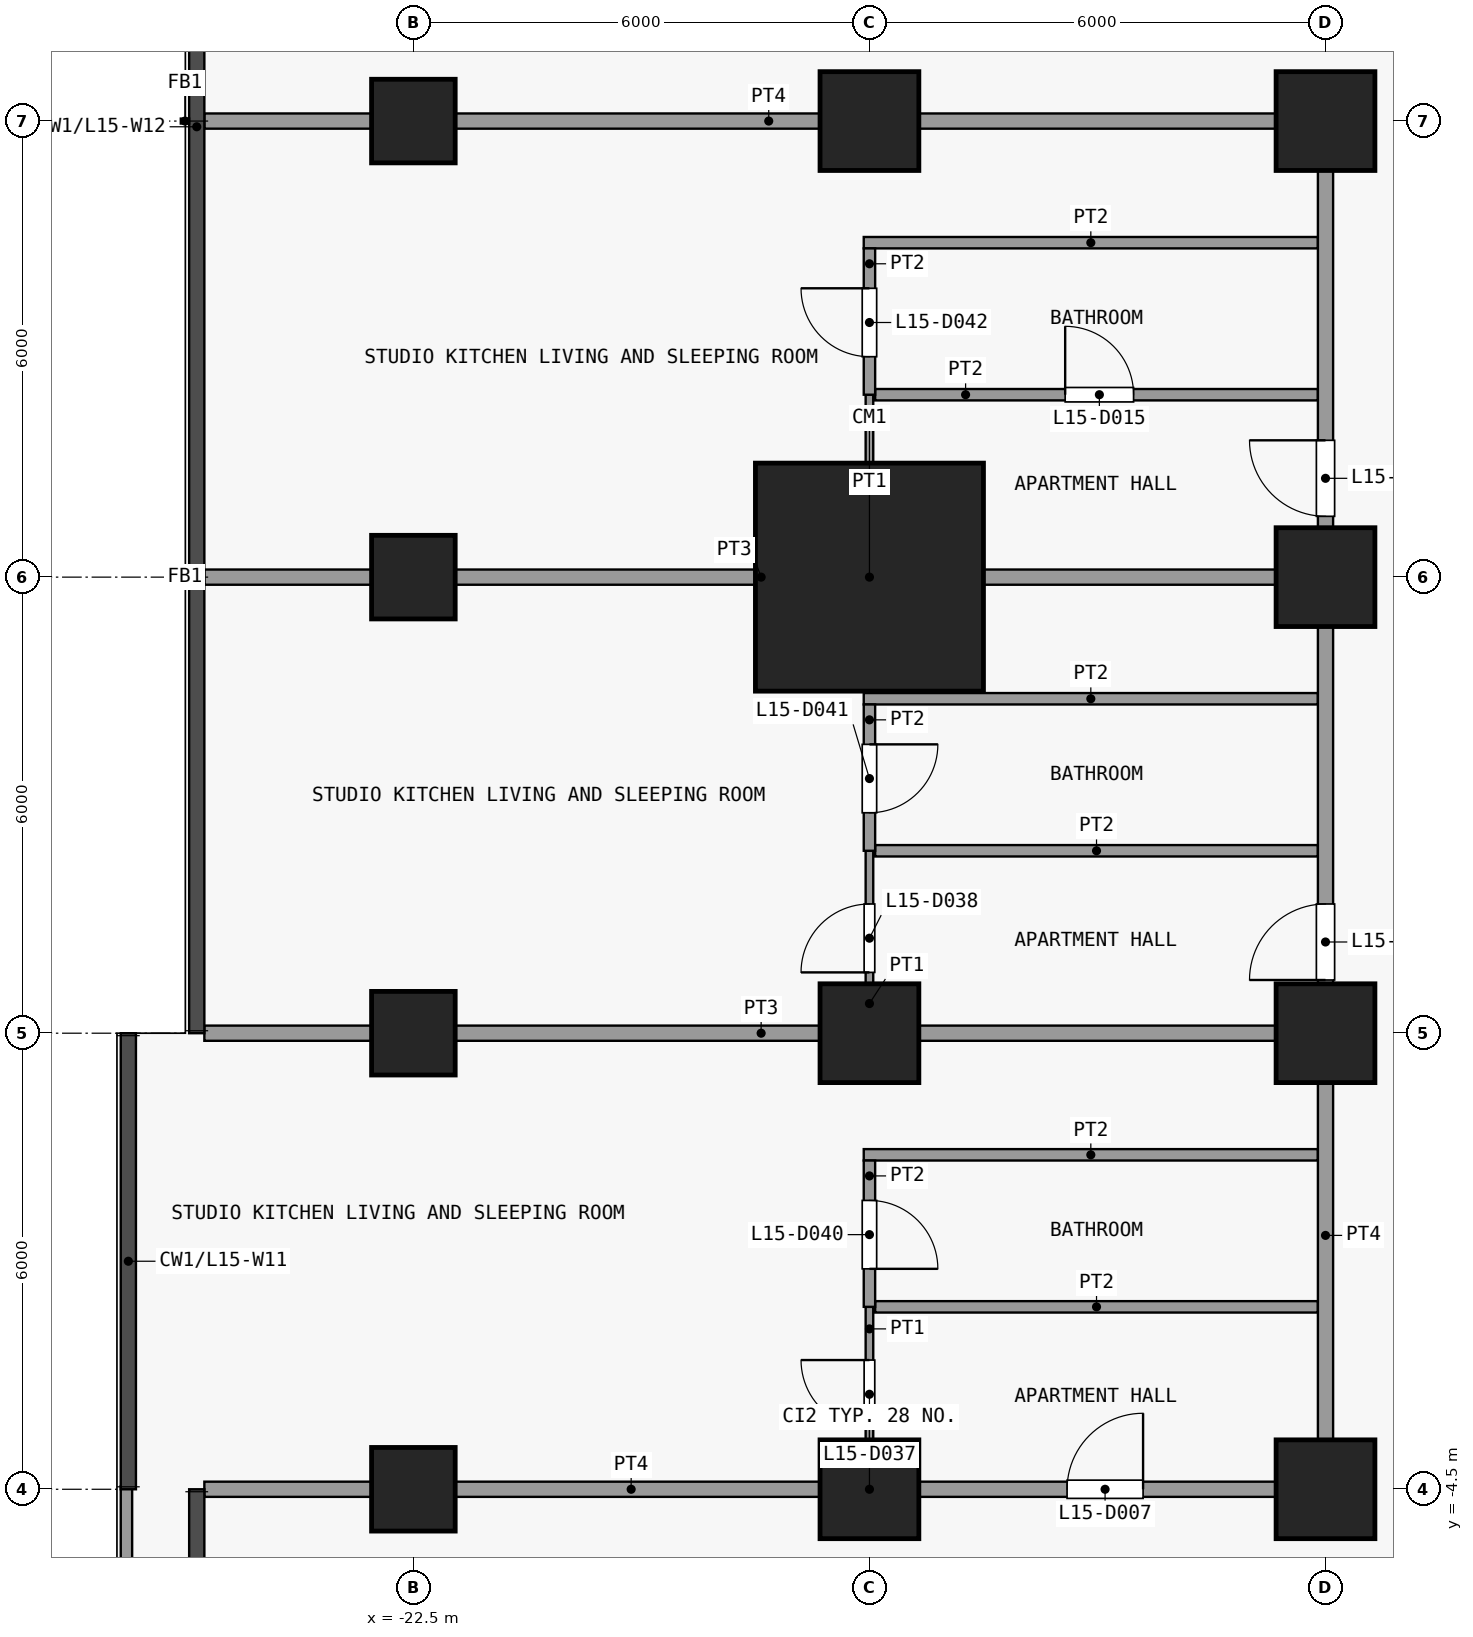
"""IFC4 building model, lengths in metres.
Left out: names, types, materials, properties, quantities, classifications, styles, units other than length and angle.
Written with IfcOpenShell. Run it as: python <this file> out.ifc"""

import sys

from ifc_helpers import new_model, si_unit, direction, frame, frame_2d, origin, origin_2d, place, context, subcontext, project, spatial, rectangle, extrude, element, fill, save


model = new_model("IFC4")
c1 = context("Model", 3, precision=1e-05, world=origin(), true_north=direction((0.0, 1.0)))
c2 = subcontext(c1, "Body", "Model", "MODEL_VIEW")
j1 = project(units=[si_unit("LENGTHUNIT", "METRE"), si_unit("PLANEANGLEUNIT", "RADIAN")], contexts=[c1])
p1 = place(None, origin())
s1 = spatial("IfcSite", under=j1, at=p1, CompositionType="ELEMENT")
p2 = place(p1, origin())
s2 = spatial("IfcBuilding", under=s1, at=p2, CompositionType="ELEMENT")
p3 = place(p2, frame((0.0, 0.0, 64.9)))
s3 = spatial("IfcBuildingStorey", under=s2, at=p3, CompositionType="ELEMENT", Elevation=64.9)
for number, where, z_axis, x_axis in (
    (1, (-22.5, -4.5, 0.0), (0.0, 0.0, 1.0), (1.0, 0.0, 0.0)),
    (2, (-22.5, 1.5, 0.0), (0.0, 0.0, 1.0), (1.0, 0.0, 0.0)),
    (3, (-22.5, 7.5, 0.0), (0.0, 0.0, 1.0), (1.0, 0.0, 0.0)),
    (4, (-22.5, 13.5, 0.0), (0.0, 0.0, 1.0), (1.0, 0.0, 0.0)),
):
    element("IfcColumn", number, at=place(p3, frame(where, z_axis=z_axis, x_axis=x_axis)), inside=s3, PredefinedType="COLUMN", context=c2, shape_type="SweptSolid", body=[
        extrude(rectangle(XDim=1.1, YDim=1.1, at=origin_2d()), origin(), (0.0, 0.0, 1.0), 3.6),
    ])
for number, where, z_axis, x_axis in (
    (5, (-16.5, -4.5, 0.0), (0.0, 0.0, 1.0), (1.0, 0.0, 0.0)),
    (6, (-16.5, 1.5, 0.0), (0.0, 0.0, 1.0), (1.0, 0.0, 0.0)),
):
    element("IfcColumn", number, at=place(p3, frame(where, z_axis=z_axis, x_axis=x_axis)), inside=s3, PredefinedType="COLUMN", context=c2, shape_type="SweptSolid", body=[
        extrude(rectangle(XDim=1.3, YDim=1.3, at=origin_2d()), origin(), (0.0, 0.0, 1.0), 3.6),
    ])
p4 = place(p3, frame((-16.5, 7.5, 0.0), z_axis=(0.0, 0.0, 1.0), x_axis=(1.0, 0.0, 0.0)))
e7 = element("IfcColumn", 7, at=p4, inside=s3, PredefinedType="COLUMN", context=c2, shape_type="SweptSolid", body=[
    extrude(rectangle(XDim=3.0, YDim=3.0, at=origin_2d()), origin(), (0.0, 0.0, 1.0), 3.6),
])
for number, where, z_axis, x_axis in (
    (8, (-16.5, 13.5, 0.0), (0.0, 0.0, 1.0), (1.0, 0.0, 0.0)),
    (9, (-10.5, -4.5, 0.0), (0.0, 0.0, 1.0), (1.0, 0.0, 0.0)),
    (10, (-10.5, 1.5, 0.0), (0.0, 0.0, 1.0), (1.0, 0.0, 0.0)),
    (11, (-10.5, 7.5, 0.0), (0.0, 0.0, 1.0), (1.0, 0.0, 0.0)),
    (12, (-10.5, 13.5, 0.0), (0.0, 0.0, 1.0), (1.0, 0.0, 0.0)),
):
    element("IfcColumn", number, at=place(p3, frame(where, z_axis=z_axis, x_axis=x_axis)), inside=s3, PredefinedType="COLUMN", context=c2, shape_type="SweptSolid", body=[
        extrude(rectangle(XDim=1.3, YDim=1.3, at=origin_2d()), origin(), (0.0, 0.0, 1.0), 3.6),
    ])
p5 = place(p3, frame((-26.275, -13.3, 0.0), z_axis=(0.0, 0.0, 1.0), x_axis=(0.0, 1.0, 0.0)))
e13 = element("IfcWall", 13, at=p5, inside=s3, PredefinedType="PARAPET", context=c2, shape_type="SweptSolid", body=[
    extrude(rectangle(XDim=8.84, YDim=0.15, at=frame_2d((4.42, 0.0))), origin(), (0.0, 0.0, 1.0), 1.15),
])
p6 = place(p3, frame((-25.25, -4.5, 0.0), z_axis=(0.0, 0.0, 1.0), x_axis=(1.0, 0.0, 0.0)))
e14 = element("IfcWall", 14, at=p6, inside=s3, PredefinedType="PARTITIONING", context=c2, shape_type="SweptSolid", body=[
    extrude(rectangle(XDim=14.85, YDim=0.2, at=frame_2d((7.425, 0.0))), origin(), (0.0, 0.0, 1.0), 3.3),
])
p7 = place(p6, frame((11.35, 0.0, 0.0)))
e15 = element("IfcOpeningElement", 15, at=p7, cuts=e14, PredefinedType="OPENING", context=c2, shape_type="SweptSolid", body=[
    extrude(rectangle(XDim=1.0, YDim=2.1, at=frame_2d((0.5, 1.05))), frame((0.0, 0.11, 0.0), z_axis=(0.0, -1.0, 0.0), x_axis=(1.0, 0.0, 0.0)), (0.0, 0.0, 1.0), 0.22),
])
p8 = place(p3, frame((-16.425, -2.1, 0.0), z_axis=(0.0, 0.0, 1.0), x_axis=(1.0, 0.0, 0.0)))
e16 = element("IfcWall", 16, at=p8, inside=s3, PredefinedType="PARTITIONING", context=c2, shape_type="SweptSolid", body=[
    extrude(rectangle(XDim=5.825, YDim=0.15, at=frame_2d((2.913, 0.0))), origin(), (0.0, 0.0, 1.0), 3.3),
])
p9 = place(p3, frame((-16.575, -0.1, 0.0), z_axis=(0.0, 0.0, 1.0), x_axis=(1.0, 0.0, 0.0)))
e17 = element("IfcWall", 17, at=p9, inside=s3, PredefinedType="PARTITIONING", context=c2, shape_type="SweptSolid", body=[
    extrude(rectangle(XDim=5.975, YDim=0.15, at=frame_2d((2.987, 0.0))), origin(), (0.0, 0.0, 1.0), 3.3),
])
p10 = place(p3, frame((-25.25, 1.5, 0.0), z_axis=(0.0, 0.0, 1.0), x_axis=(1.0, 0.0, 0.0)))
e18 = element("IfcWall", 18, at=p10, inside=s3, PredefinedType="PARTITIONING", context=c2, shape_type="SweptSolid", body=[
    extrude(rectangle(XDim=14.65, YDim=0.2, at=frame_2d((7.325, 0.0))), origin(), (0.0, 0.0, 1.0), 3.3),
])
p11 = place(p3, frame((-16.425, 3.9, 0.0), z_axis=(0.0, 0.0, 1.0), x_axis=(1.0, 0.0, 0.0)))
e19 = element("IfcWall", 19, at=p11, inside=s3, PredefinedType="PARTITIONING", context=c2, shape_type="SweptSolid", body=[
    extrude(rectangle(XDim=5.825, YDim=0.15, at=frame_2d((2.913, 0.0))), origin(), (0.0, 0.0, 1.0), 3.3),
])
p12 = place(p3, frame((-16.575, 5.9, 0.0), z_axis=(0.0, 0.0, 1.0), x_axis=(1.0, 0.0, 0.0)))
e20 = element("IfcWall", 20, at=p12, inside=s3, PredefinedType="PARTITIONING", context=c2, shape_type="SweptSolid", body=[
    extrude(rectangle(XDim=5.975, YDim=0.15, at=frame_2d((2.987, 0.0))), origin(), (0.0, 0.0, 1.0), 3.3),
])
p13 = place(p3, frame((-25.25, 7.5, 0.0), z_axis=(0.0, 0.0, 1.0), x_axis=(1.0, 0.0, 0.0)))
e21 = element("IfcWall", 21, at=p13, inside=s3, PredefinedType="PARTITIONING", context=c2, shape_type="SweptSolid", body=[
    extrude(rectangle(XDim=14.65, YDim=0.2, at=frame_2d((7.325, 0.0))), origin(), (0.0, 0.0, 1.0), 3.3),
])
p14 = place(p3, frame((-16.425, 9.9, 0.0), z_axis=(0.0, 0.0, 1.0), x_axis=(1.0, 0.0, 0.0)))
e22 = element("IfcWall", 22, at=p14, inside=s3, PredefinedType="PARTITIONING", context=c2, shape_type="SweptSolid", body=[
    extrude(rectangle(XDim=5.825, YDim=0.15, at=frame_2d((2.913, 0.0))), origin(), (0.0, 0.0, 1.0), 3.3),
])
p15 = place(p14, frame((2.5, 0.0, 0.0)))
e23 = element("IfcOpeningElement", 23, at=p15, cuts=e22, PredefinedType="OPENING", context=c2, shape_type="SweptSolid", body=[
    extrude(rectangle(XDim=0.9, YDim=2.1, at=frame_2d((0.45, 1.05))), frame((0.0, 0.085, 0.0), z_axis=(0.0, -1.0, 0.0), x_axis=(1.0, 0.0, 0.0)), (0.0, 0.0, 1.0), 0.17),
])
p16 = place(p3, frame((-16.575, 11.9, 0.0), z_axis=(0.0, 0.0, 1.0), x_axis=(1.0, 0.0, 0.0)))
e24 = element("IfcWall", 24, at=p16, inside=s3, PredefinedType="PARTITIONING", context=c2, shape_type="SweptSolid", body=[
    extrude(rectangle(XDim=5.975, YDim=0.15, at=frame_2d((2.987, 0.0))), origin(), (0.0, 0.0, 1.0), 3.3),
])
p17 = place(p3, frame((-25.25, 13.5, 0.0), z_axis=(0.0, 0.0, 1.0), x_axis=(1.0, 0.0, 0.0)))
e25 = element("IfcWall", 25, at=p17, inside=s3, PredefinedType="PARTITIONING", context=c2, shape_type="SweptSolid", body=[
    extrude(rectangle(XDim=14.85, YDim=0.2, at=frame_2d((7.425, 0.0))), origin(), (0.0, 0.0, 1.0), 3.3),
])
p18 = place(p3, frame((-16.5, -4.4, 0.0), z_axis=(0.0, 0.0, 1.0), x_axis=(0.0, 1.0, 0.0)))
e26 = element("IfcWall", 26, at=p18, inside=s3, PredefinedType="PARTITIONING", context=c2, shape_type="SweptSolid", body=[
    extrude(rectangle(XDim=2.3, YDim=0.1, at=frame_2d((1.15, 0.0))), origin(), (0.0, 0.0, 1.0), 3.3),
])
p19 = place(p18, frame((0.7, 0.0, 0.0)))
e27 = element("IfcOpeningElement", 27, at=p19, cuts=e26, PredefinedType="OPENING", context=c2, shape_type="SweptSolid", body=[
    extrude(rectangle(XDim=0.9, YDim=2.1, at=frame_2d((0.45, 1.05))), frame((0.0, 0.06, 0.0), z_axis=(0.0, -1.0, 0.0), x_axis=(1.0, 0.0, 0.0)), (0.0, 0.0, 1.0), 0.12),
])
p20 = place(p3, frame((-16.5, 1.6, 0.0), z_axis=(0.0, 0.0, 1.0), x_axis=(0.0, 1.0, 0.0)))
e28 = element("IfcWall", 28, at=p20, inside=s3, PredefinedType="PARTITIONING", context=c2, shape_type="SweptSolid", body=[
    extrude(rectangle(XDim=2.3, YDim=0.1, at=frame_2d((1.15, 0.0))), origin(), (0.0, 0.0, 1.0), 3.3),
])
p21 = place(p20, frame((0.7, 0.0, 0.0)))
e29 = element("IfcOpeningElement", 29, at=p21, cuts=e28, PredefinedType="OPENING", context=c2, shape_type="SweptSolid", body=[
    extrude(rectangle(XDim=0.9, YDim=2.1, at=frame_2d((0.45, 1.05))), frame((0.0, 0.06, 0.0), z_axis=(0.0, -1.0, 0.0), x_axis=(1.0, 0.0, 0.0)), (0.0, 0.0, 1.0), 0.12),
])
p22 = place(p3, frame((-16.5, 7.6, 0.0), z_axis=(0.0, 0.0, 1.0), x_axis=(0.0, 1.0, 0.0)))
e30 = element("IfcWall", 30, at=p22, inside=s3, PredefinedType="PARTITIONING", context=c2, shape_type="SweptSolid", body=[
    extrude(rectangle(XDim=2.3, YDim=0.1, at=frame_2d((1.15, 0.0))), origin(), (0.0, 0.0, 1.0), 3.3),
])
p23 = place(p3, frame((-16.5, -2.1, 0.0), z_axis=(0.0, 0.0, 1.0), x_axis=(0.0, 1.0, 0.0)))
e31 = element("IfcWall", 31, at=p23, inside=s3, PredefinedType="PARTITIONING", context=c2, shape_type="SweptSolid", body=[
    extrude(rectangle(XDim=1.925, YDim=0.15, at=frame_2d((0.962, 0.0))), origin(), (0.0, 0.0, 1.0), 3.3),
])
p24 = place(p23, frame((0.5, 0.0, 0.0)))
e32 = element("IfcOpeningElement", 32, at=p24, cuts=e31, PredefinedType="OPENING", context=c2, shape_type="SweptSolid", body=[
    extrude(rectangle(XDim=0.9, YDim=2.1, at=frame_2d((0.45, 1.05))), frame((0.0, 0.085, 0.0), z_axis=(0.0, -1.0, 0.0), x_axis=(1.0, 0.0, 0.0)), (0.0, 0.0, 1.0), 0.17),
])
p25 = place(p3, frame((-16.5, 3.9, 0.0), z_axis=(0.0, 0.0, 1.0), x_axis=(0.0, 1.0, 0.0)))
e33 = element("IfcWall", 33, at=p25, inside=s3, PredefinedType="PARTITIONING", context=c2, shape_type="SweptSolid", body=[
    extrude(rectangle(XDim=1.925, YDim=0.15, at=frame_2d((0.962, 0.0))), origin(), (0.0, 0.0, 1.0), 3.3),
])
p26 = place(p25, frame((0.5, 0.0, 0.0)))
e34 = element("IfcOpeningElement", 34, at=p26, cuts=e33, PredefinedType="OPENING", context=c2, shape_type="SweptSolid", body=[
    extrude(rectangle(XDim=0.9, YDim=2.1, at=frame_2d((0.45, 1.05))), frame((0.0, 0.085, 0.0), z_axis=(0.0, -1.0, 0.0), x_axis=(1.0, 0.0, 0.0)), (0.0, 0.0, 1.0), 0.17),
])
p27 = place(p3, frame((-16.5, 9.9, 0.0), z_axis=(0.0, 0.0, 1.0), x_axis=(0.0, 1.0, 0.0)))
e35 = element("IfcWall", 35, at=p27, inside=s3, PredefinedType="PARTITIONING", context=c2, shape_type="SweptSolid", body=[
    extrude(rectangle(XDim=1.925, YDim=0.15, at=frame_2d((0.962, 0.0))), origin(), (0.0, 0.0, 1.0), 3.3),
])
p28 = place(p27, frame((0.5, 0.0, 0.0)))
e36 = element("IfcOpeningElement", 36, at=p28, cuts=e35, PredefinedType="OPENING", context=c2, shape_type="SweptSolid", body=[
    extrude(rectangle(XDim=0.9, YDim=2.1, at=frame_2d((0.45, 1.05))), frame((0.0, 0.085, 0.0), z_axis=(0.0, -1.0, 0.0), x_axis=(1.0, 0.0, 0.0)), (0.0, 0.0, 1.0), 0.17),
])
p29 = place(p3, frame((-10.5, -4.4, 0.0), z_axis=(0.0, 0.0, 1.0), x_axis=(0.0, 1.0, 0.0)))
e37 = element("IfcWall", 37, at=p29, inside=s3, PredefinedType="PARTITIONING", context=c2, shape_type="SweptSolid", body=[
    extrude(rectangle(XDim=17.8, YDim=0.2, at=frame_2d((8.9, 0.0))), origin(), (0.0, 0.0, 1.0), 3.3),
])
p30 = place(p29, frame((6.6, 0.0, 0.0)))
e38 = element("IfcOpeningElement", 38, at=p30, cuts=e37, PredefinedType="OPENING", context=c2, shape_type="SweptSolid", body=[
    extrude(rectangle(XDim=1.0, YDim=2.1, at=frame_2d((0.5, 1.05))), frame((0.0, 0.11, 0.0), z_axis=(0.0, -1.0, 0.0), x_axis=(1.0, 0.0, 0.0)), (0.0, 0.0, 1.0), 0.22),
])
p31 = place(p29, frame((12.7, 0.0, 0.0)))
e39 = element("IfcOpeningElement", 39, at=p31, cuts=e37, PredefinedType="OPENING", context=c2, shape_type="SweptSolid", body=[
    extrude(rectangle(XDim=1.0, YDim=2.1, at=frame_2d((0.5, 1.05))), frame((0.0, 0.11, 0.0), z_axis=(0.0, -1.0, 0.0), x_axis=(1.0, 0.0, 0.0)), (0.0, 0.0, 1.0), 0.22),
])
p32 = place(p7, origin())
e40 = element("IfcDoor", 40, at=p32, inside=s3, OperationType="SINGLE_SWING_LEFT", PredefinedType="DOOR", context=c2, shape_type="SweptSolid", body=[
    extrude(rectangle(XDim=1.0, YDim=2.1, at=frame_2d((0.5, 1.05))), frame((0.0, 0.025, 0.0), z_axis=(0.0, -1.0, 0.0), x_axis=(1.0, 0.0, 0.0)), (0.0, 0.0, 1.0), 0.05),
])
fill(e15, e40)
p33 = place(p15, origin())
e41 = element("IfcDoor", 41, at=p33, inside=s3, OperationType="SINGLE_SWING_RIGHT", PredefinedType="DOOR", context=c2, shape_type="SweptSolid", body=[
    extrude(rectangle(XDim=0.9, YDim=2.1, at=frame_2d((0.45, 1.05))), frame((0.0, 0.025, 0.0), z_axis=(0.0, -1.0, 0.0), x_axis=(1.0, 0.0, 0.0)), (0.0, 0.0, 1.0), 0.05),
])
fill(e23, e41)
p34 = place(p19, origin())
e42 = element("IfcDoor", 42, at=p34, inside=s3, OperationType="SINGLE_SWING_LEFT", PredefinedType="DOOR", context=c2, shape_type="SweptSolid", body=[
    extrude(rectangle(XDim=0.9, YDim=2.1, at=frame_2d((0.45, 1.05))), frame((0.0, 0.025, 0.0), z_axis=(0.0, -1.0, 0.0), x_axis=(1.0, 0.0, 0.0)), (0.0, 0.0, 1.0), 0.05),
])
fill(e27, e42)
p35 = place(p21, origin())
e43 = element("IfcDoor", 43, at=p35, inside=s3, OperationType="SINGLE_SWING_RIGHT", PredefinedType="DOOR", context=c2, shape_type="SweptSolid", body=[
    extrude(rectangle(XDim=0.9, YDim=2.1, at=frame_2d((0.45, 1.05))), frame((0.0, 0.025, 0.0), z_axis=(0.0, -1.0, 0.0), x_axis=(1.0, 0.0, 0.0)), (0.0, 0.0, 1.0), 0.05),
])
fill(e29, e43)
p36 = place(p24, origin())
e44 = element("IfcDoor", 44, at=p36, inside=s3, OperationType="SINGLE_SWING_LEFT", PredefinedType="DOOR", context=c2, shape_type="SweptSolid", body=[
    extrude(rectangle(XDim=0.9, YDim=2.1, at=frame_2d((0.45, 1.05))), frame((0.0, 0.025, 0.0), z_axis=(0.0, -1.0, 0.0), x_axis=(1.0, 0.0, 0.0)), (0.0, 0.0, 1.0), 0.05),
])
fill(e32, e44)
p37 = place(p26, origin())
e45 = element("IfcDoor", 45, at=p37, inside=s3, OperationType="SINGLE_SWING_RIGHT", PredefinedType="DOOR", context=c2, shape_type="SweptSolid", body=[
    extrude(rectangle(XDim=0.9, YDim=2.1, at=frame_2d((0.45, 1.05))), frame((0.0, 0.025, 0.0), z_axis=(0.0, -1.0, 0.0), x_axis=(1.0, 0.0, 0.0)), (0.0, 0.0, 1.0), 0.05),
])
fill(e34, e45)
p38 = place(p28, origin())
e46 = element("IfcDoor", 46, at=p38, inside=s3, OperationType="SINGLE_SWING_LEFT", PredefinedType="DOOR", context=c2, shape_type="SweptSolid", body=[
    extrude(rectangle(XDim=0.9, YDim=2.1, at=frame_2d((0.45, 1.05))), frame((0.0, 0.025, 0.0), z_axis=(0.0, -1.0, 0.0), x_axis=(1.0, 0.0, 0.0)), (0.0, 0.0, 1.0), 0.05),
])
fill(e36, e46)
p39 = place(p30, origin())
e47 = element("IfcDoor", 47, at=p39, inside=s3, OperationType="SINGLE_SWING_RIGHT", PredefinedType="DOOR", context=c2, shape_type="SweptSolid", body=[
    extrude(rectangle(XDim=1.0, YDim=2.1, at=frame_2d((0.5, 1.05))), frame((0.0, 0.025, 0.0), z_axis=(0.0, -1.0, 0.0), x_axis=(1.0, 0.0, 0.0)), (0.0, 0.0, 1.0), 0.05),
])
fill(e38, e47)
p40 = place(p31, origin())
e48 = element("IfcDoor", 48, at=p40, inside=s3, OperationType="SINGLE_SWING_LEFT", PredefinedType="DOOR", context=c2, shape_type="SweptSolid", body=[
    extrude(rectangle(XDim=1.0, YDim=2.1, at=frame_2d((0.5, 1.05))), frame((0.0, 0.025, 0.0), z_axis=(0.0, -1.0, 0.0), x_axis=(1.0, 0.0, 0.0)), (0.0, 0.0, 1.0), 0.05),
])
fill(e39, e48)
save(model, sys.argv[1])
